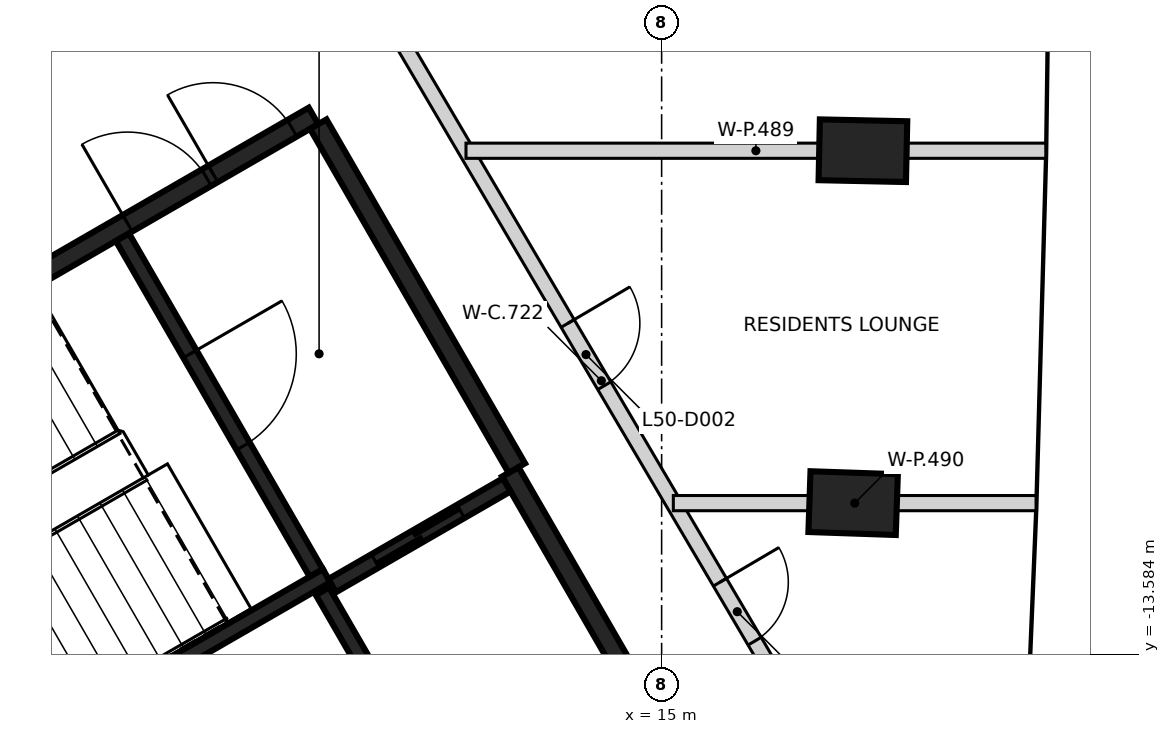
"""IFC4 building model, lengths in metres.
Left out: names, types, materials, properties, quantities, classifications, styles, units other than length and angle.
Written with IfcOpenShell. Run it as: python <this file> out.ifc"""

import sys

from ifc_helpers import new_model, si_unit, direction, frame, frame_2d, origin, origin_2d, place, context, subcontext, project, spatial, rectangle, extrude, element, fill, save


model = new_model("IFC4")
c1 = context("Model", 3, precision=1e-05, world=origin(), true_north=direction((0.0, 1.0)))
c2 = subcontext(c1, "Body", "Model", "MODEL_VIEW")
j1 = project(units=[si_unit("LENGTHUNIT", "METRE"), si_unit("PLANEANGLEUNIT", "RADIAN")], contexts=[c1])
p1 = place(None, origin())
s1 = spatial("IfcSite", under=j1, at=p1, CompositionType="ELEMENT")
p2 = place(p1, origin())
s2 = spatial("IfcBuilding", under=s1, at=p2, CompositionType="ELEMENT")
p3 = place(p2, frame((0.0, 0.0, 200.8)))
s3 = spatial("IfcBuildingStorey", under=s2, at=p3, CompositionType="ELEMENT", Elevation=200.8)
for number, where, z_axis, x_axis in (
    (1, (17.519, -11.592, -0.35), (0.0, 0.0, 1.0), (-0.999, 0.034, 0.0)),
    (2, (17.648, -6.956, -0.35), (0.0, 0.0, 1.0), (-1.0, 0.021, 0.0)),
):
    element("IfcColumn", number, at=place(p3, frame(where, z_axis=z_axis, x_axis=x_axis)), inside=s3, PredefinedType="COLUMN", context=c2, shape_type="SweptSolid", body=[
        extrude(rectangle(XDim=1.15, YDim=0.8, at=origin_2d()), origin(), (0.0, 0.0, 1.0), 3.6),
    ])
p4 = place(p3, frame((0.417, -12.273, 0.0), z_axis=(0.0, 0.0, 1.0), x_axis=(0.866021906294, 0.500006057782, 0.0)))
e3 = element("IfcWall", 3, at=p4, inside=s3, PredefinedType="SHEAR", context=c2, shape_type="SweptSolid", body=[
    extrude(rectangle(XDim=11.55, YDim=0.25, at=frame_2d((5.775, 0.0))), origin(), (0.0, 0.0, 1.0), 3.25),
])
p5 = place(p4, frame((10.025, 0.0, 0.0)))
e4 = element("IfcOpeningElement", 4, at=p5, cuts=e3, PredefinedType="OPENING", context=c2, shape_type="SweptSolid", body=[
    extrude(rectangle(XDim=1.2, YDim=2.1, at=frame_2d((0.6, 1.05))), frame((0.0, 0.135, 0.0), z_axis=(0.0, -1.0, 0.0), x_axis=(1.0, 0.0, 0.0)), (0.0, 0.0, 1.0), 0.27),
])
p6 = place(p4, frame((8.725, 0.0, 0.0)))
e5 = element("IfcOpeningElement", 5, at=p6, cuts=e3, PredefinedType="OPENING", context=c2, shape_type="SweptSolid", body=[
    extrude(rectangle(XDim=1.2, YDim=2.1, at=frame_2d((0.6, 1.05))), frame((0.0, 0.135, 0.0), z_axis=(0.0, -1.0, 0.0), x_axis=(1.0, 0.0, 0.0)), (0.0, 0.0, 1.0), 0.27),
])
p7 = place(p3, frame((13.008, -11.181, 0.0), z_axis=(0.0, 0.0, 1.0), x_axis=(0.500001955336, -0.866024274868, 0.0)))
e6 = element("IfcWall", 6, at=p7, inside=s3, PredefinedType="SHEAR", context=c2, shape_type="SweptSolid", body=[
    extrude(rectangle(XDim=6.125, YDim=0.25, at=frame_2d((3.062, 0.0))), origin(), (0.0, 0.0, 1.0), 3.25),
])
p8 = place(p7, frame((3.563, 0.0, 0.0)))
e7 = element("IfcOpeningElement", 7, at=p8, cuts=e6, PredefinedType="OPENING", context=c2, shape_type="SweptSolid", body=[
    extrude(rectangle(XDim=1.0, YDim=2.1, at=frame_2d((0.5, 1.05))), frame((0.0, 0.135, 0.0), z_axis=(0.0, -1.0, 0.0), x_axis=(1.0, 0.0, 0.0)), (0.0, 0.0, 1.0), 0.27),
])
p9 = place(p3, frame((10.483, -6.606, 0.0), z_axis=(0.0, 0.0, 1.0), x_axis=(0.49999885962, -0.866026062182, 0.0)))
e8 = element("IfcWall", 8, at=p9, inside=s3, PredefinedType="SHEAR", context=c2, shape_type="SweptSolid", body=[
    extrude(rectangle(XDim=5.225, YDim=0.25, at=frame_2d((2.612, 0.0))), origin(), (0.0, 0.0, 1.0), 3.25),
])
p10 = place(p3, frame((5.419, -15.534, 0.0), z_axis=(0.0, 0.0, 1.0), x_axis=(0.866029065029, 0.499993658486, 0.0)))
e9 = element("IfcWall", 9, at=p10, inside=s3, PredefinedType="SHEAR", context=c2, shape_type="SweptSolid", body=[
    extrude(rectangle(XDim=5.974, YDim=0.2, at=frame_2d((2.987, 0.0))), origin(), (0.0, 0.0, 1.0), 3.25),
])
p11 = place(p3, frame((7.906, -8.094, 0.0), z_axis=(0.0, 0.0, 1.0), x_axis=(0.500027839223, -0.866009330205, 0.0)))
e10 = element("IfcWall", 10, at=p11, inside=s3, PredefinedType="SHEAR", context=c2, shape_type="SweptSolid", body=[
    extrude(rectangle(XDim=5.098, YDim=0.2, at=frame_2d((2.549, 0.0))), origin(), (0.0, 0.0, 1.0), 3.25),
])
p12 = place(p11, frame((1.774, 0.0, 0.0)))
e11 = element("IfcOpeningElement", 11, at=p12, cuts=e10, PredefinedType="OPENING", context=c2, shape_type="SweptSolid", body=[
    extrude(rectangle(XDim=1.4, YDim=2.1, at=frame_2d((0.7, 1.05))), frame((0.0, 0.11, 0.0), z_axis=(0.0, -1.0, 0.0), x_axis=(1.0, 0.0, 0.0)), (0.0, 0.0, 1.0), 0.22),
])
p13 = place(p3, frame((12.088, -15.437, 0.0), z_axis=(0.0, 0.0, 1.0), x_axis=(-0.500026960575, 0.86600983753, 0.0)))
e12 = element("IfcWall", 12, at=p13, inside=s3, PredefinedType="SHEAR", context=c2, shape_type="SweptSolid", body=[
    extrude(rectangle(XDim=3.1, YDim=0.2, at=frame_2d((1.55, 0.0))), origin(), (0.0, 0.0, 1.0), 3.25),
])
p14 = place(p3, frame((10.666, -12.678, 0.0), z_axis=(0.0, 0.0, 1.0), x_axis=(0.866018407898, 0.500012117035, 0.0)))
e13 = element("IfcWall", 13, at=p14, inside=s3, PredefinedType="SHEAR", context=c2, shape_type="SweptSolid", body=[
    extrude(rectangle(XDim=2.651, YDim=0.2, at=frame_2d((1.325, 0.0))), origin(), (0.0, 0.0, 1.0), 3.25),
])
p15 = place(p14, frame((0.652, 0.0, 0.0)))
e14 = element("IfcOpeningElement", 14, at=p15, cuts=e13, PredefinedType="OPENING", context=c2, shape_type="SweptSolid", body=[
    extrude(rectangle(XDim=1.3, YDim=2.1, at=frame_2d((0.65, 1.05))), frame((0.0, 0.11, 0.0), z_axis=(0.0, -1.0, 0.0), x_axis=(1.0, 0.0, 0.0)), (0.0, 0.0, 1.0), 0.22),
])
p16 = place(p3, frame((11.573, -5.504, 0.0), z_axis=(0.0, 0.0, 1.0), x_axis=(0.507120747865, -0.861875018251, 0.0)))
e15 = element("IfcWall", 15, at=p16, inside=s3, PredefinedType="PARTITIONING", context=c2, shape_type="SweptSolid", body=[
    extrude(rectangle(XDim=10.391, YDim=0.2, at=frame_2d((5.196, 0.0))), origin(), (0.0, 0.0, 1.0), 3.25),
])
p17 = place(p16, frame((8.271, 0.0, 0.0)))
e16 = element("IfcOpeningElement", 16, at=p17, cuts=e15, PredefinedType="OPENING", context=c2, shape_type="SweptSolid", body=[
    extrude(rectangle(XDim=0.9, YDim=2.1, at=frame_2d((0.45, 1.05))), frame((0.0, 0.11, 0.0), z_axis=(0.0, -1.0, 0.0), x_axis=(1.0, 0.0, 0.0)), (0.0, 0.0, 1.0), 0.22),
])
p18 = place(p16, frame((4.321, 0.0, 0.0)))
e17 = element("IfcOpeningElement", 17, at=p18, cuts=e15, PredefinedType="OPENING", context=c2, shape_type="SweptSolid", body=[
    extrude(rectangle(XDim=0.95, YDim=2.1, at=frame_2d((0.475, 1.05))), frame((0.0, 0.11, 0.0), z_axis=(0.0, -1.0, 0.0), x_axis=(1.0, 0.0, 0.0)), (0.0, 0.0, 1.0), 0.22),
])
p19 = place(p3, frame((12.426, -6.956, 0.0), z_axis=(0.0, 0.0, 1.0), x_axis=(1.0, 0.0, 0.0)))
e18 = element("IfcWall", 18, at=p19, inside=s3, PredefinedType="PARTITIONING", context=c2, shape_type="SweptSolid", body=[
    extrude(rectangle(XDim=7.628, YDim=0.2, at=frame_2d((3.814, 0.0))), origin(), (0.0, 0.0, 1.0), 3.25),
])
p20 = place(p3, frame((15.154, -11.592, 0.0), z_axis=(0.0, 0.0, 1.0), x_axis=(1.0, 0.0, 0.0)))
e19 = element("IfcWall", 19, at=p20, inside=s3, PredefinedType="PARTITIONING", context=c2, shape_type="SweptSolid", body=[
    extrude(rectangle(XDim=4.772, YDim=0.2, at=frame_2d((2.386, 0.0))), origin(), (0.0, 0.0, 1.0), 3.25),
])
p21 = place(p15, origin())
e20 = element("IfcDoor", 20, at=p21, inside=s3, OperationType="SLIDING_TO_LEFT", PredefinedType="DOOR", context=c2, shape_type="SweptSolid", body=[
    extrude(rectangle(XDim=1.3, YDim=2.1, at=frame_2d((0.65, 1.05))), frame((0.0, 0.025, 0.0), z_axis=(0.0, -1.0, 0.0), x_axis=(1.0, 0.0, 0.0)), (0.0, 0.0, 1.0), 0.05),
])
fill(e14, e20)
p22 = place(p5, origin())
e21 = element("IfcDoor", 21, at=p22, inside=s3, OperationType="SINGLE_SWING_LEFT", PredefinedType="DOOR", context=c2, shape_type="SweptSolid", body=[
    extrude(rectangle(XDim=1.2, YDim=2.1, at=frame_2d((0.6, 1.05))), frame((0.0, 0.025, 0.0), z_axis=(0.0, -1.0, 0.0), x_axis=(1.0, 0.0, 0.0)), (0.0, 0.0, 1.0), 0.05),
])
fill(e4, e21)
p23 = place(p6, origin())
e22 = element("IfcDoor", 22, at=p23, inside=s3, OperationType="SINGLE_SWING_RIGHT", PredefinedType="DOOR", context=c2, shape_type="SweptSolid", body=[
    extrude(rectangle(XDim=1.2, YDim=2.1, at=frame_2d((0.6, 1.05))), frame((0.0, 0.025, 0.0), z_axis=(0.0, -1.0, 0.0), x_axis=(1.0, 0.0, 0.0)), (0.0, 0.0, 1.0), 0.05),
])
fill(e5, e22)
p24 = place(p12, origin())
e23 = element("IfcDoor", 23, at=p24, inside=s3, OperationType="SINGLE_SWING_LEFT", PredefinedType="DOOR", context=c2, shape_type="SweptSolid", body=[
    extrude(rectangle(XDim=1.4, YDim=2.1, at=frame_2d((0.7, 1.05))), frame((0.0, 0.025, 0.0), z_axis=(0.0, -1.0, 0.0), x_axis=(1.0, 0.0, 0.0)), (0.0, 0.0, 1.0), 0.05),
])
fill(e11, e23)
p25 = place(p17, origin())
e24 = element("IfcDoor", 24, at=p25, inside=s3, OperationType="SINGLE_SWING_LEFT", PredefinedType="DOOR", context=c2, shape_type="SweptSolid", body=[
    extrude(rectangle(XDim=0.9, YDim=2.1, at=frame_2d((0.45, 1.05))), frame((0.0, 0.025, 0.0), z_axis=(0.0, -1.0, 0.0), x_axis=(1.0, 0.0, 0.0)), (0.0, 0.0, 1.0), 0.05),
])
fill(e16, e24)
p26 = place(p18, origin())
e25 = element("IfcDoor", 25, at=p26, inside=s3, OperationType="SINGLE_SWING_LEFT", PredefinedType="DOOR", context=c2, shape_type="SweptSolid", body=[
    extrude(rectangle(XDim=0.95, YDim=2.1, at=frame_2d((0.475, 1.05))), frame((0.0, 0.025, 0.0), z_axis=(0.0, -1.0, 0.0), x_axis=(1.0, 0.0, 0.0)), (0.0, 0.0, 1.0), 0.05),
])
fill(e17, e25)
save(model, sys.argv[1])
